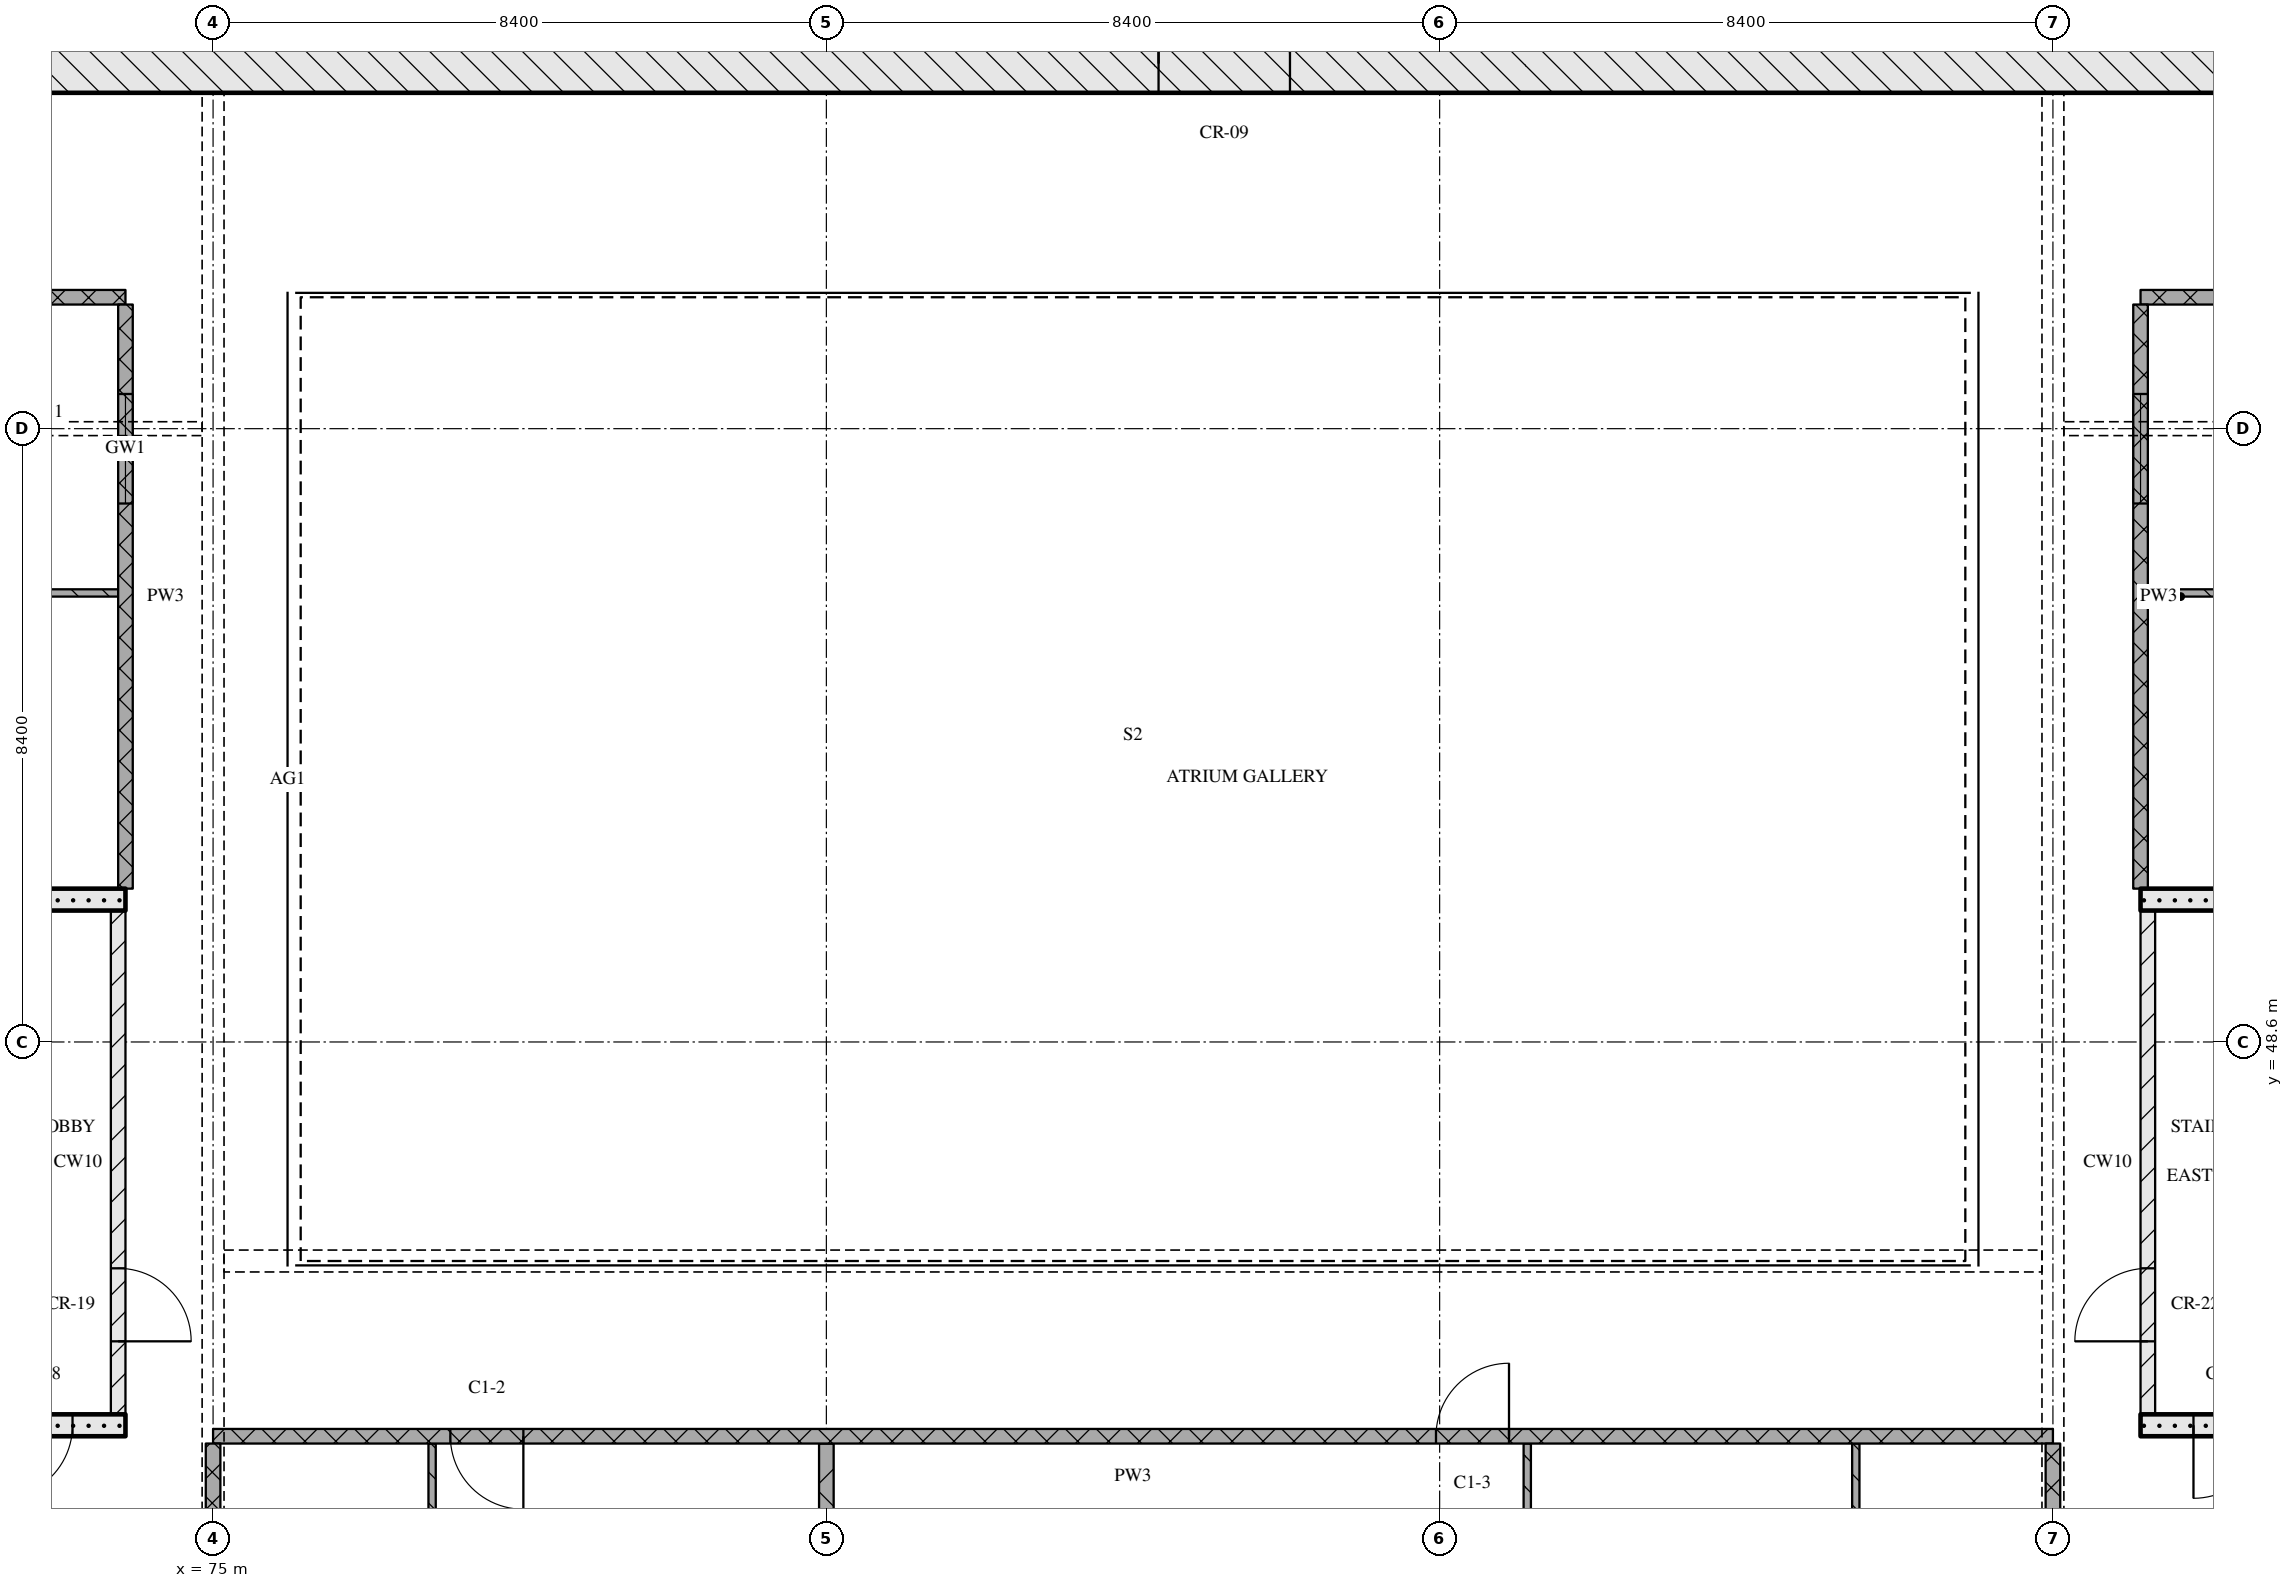
"""IFC4 building model, lengths in metres.
Left out: names, types, materials, properties, quantities, classifications, styles, units other than length and angle.
Written with IfcOpenShell. Run it as: python <this file> out.ifc"""

import sys

from ifc_helpers import new_model, si_unit, direction, frame, frame_2d, origin, place, context, subcontext, project, spatial, rectangle, extrude, element, fill, save


model = new_model("IFC4")
c1 = context("Model", 3, precision=1e-05, world=origin(), true_north=direction((0.0, 1.0)))
c2 = subcontext(c1, "Body", "Model", "MODEL_VIEW")
j1 = project(units=[si_unit("LENGTHUNIT", "METRE"), si_unit("PLANEANGLEUNIT", "RADIAN")], contexts=[c1])
p1 = place(None, origin())
s1 = spatial("IfcSite", under=j1, at=p1, CompositionType="ELEMENT")
p2 = place(p1, origin())
s2 = spatial("IfcBuilding", under=s1, at=p2, CompositionType="ELEMENT")
p3 = place(p2, frame((0.0, 0.0, 151.05)))
s3 = spatial("IfcBuildingStorey", under=s2, at=p3, CompositionType="ELEMENT", Elevation=151.05)
p4 = place(p3, frame((67.0, 62.0, 0.0), z_axis=(0.0, 0.0, 1.0), x_axis=(1.0, 0.0, 0.0)))
e1 = element("IfcWall", 1, at=p4, inside=s3, PredefinedType="SOLIDWALL", context=c2, shape_type="SweptSolid", body=[
    extrude(rectangle(XDim=41.2, YDim=0.8, at=frame_2d((20.6, 0.0))), origin(), (0.0, 0.0, 1.0), 3.32),
])
p5 = place(p4, frame((20.95, 0.0, 0.0)))
e2 = element("IfcOpeningElement", 2, at=p5, cuts=e1, PredefinedType="OPENING", context=c2, shape_type="SweptSolid", body=[
    extrude(rectangle(XDim=1.8, YDim=2.1, at=frame_2d((0.9, 1.05))), frame((0.0, 0.41, 0.0), z_axis=(0.0, -1.0, 0.0), x_axis=(1.0, 0.0, 0.0)), (0.0, 0.0, 1.0), 0.82),
])
p6 = place(p3, frame((68.2, 43.35, 0.0), z_axis=(0.0, 0.0, 1.0), x_axis=(1.0, 0.0, 0.0)))
e3 = element("IfcWall", 3, at=p6, inside=s3, PredefinedType="SOLIDWALL", context=c2, shape_type="SweptSolid", body=[
    extrude(rectangle(XDim=5.6, YDim=0.3, at=frame_2d((2.8, 0.0))), origin(), (0.0, 0.0, 1.0), 3.32),
])
p7 = place(p6, frame((3.875, 0.0, 0.0)))
e4 = element("IfcOpeningElement", 4, at=p7, cuts=e3, PredefinedType="OPENING", context=c2, shape_type="SweptSolid", body=[
    extrude(rectangle(XDim=1.0, YDim=2.1, at=frame_2d((0.5, 1.05))), frame((0.0, 0.16, 0.0), z_axis=(0.0, -1.0, 0.0), x_axis=(1.0, 0.0, 0.0)), (0.0, 0.0, 1.0), 0.32),
])
p8 = place(p3, frame((73.7, 43.5, 0.0), z_axis=(0.0, 0.0, 1.0), x_axis=(0.0, 1.0, 0.0)))
e5 = element("IfcWall", 5, at=p8, inside=s3, PredefinedType="PARTITIONING", context=c2, shape_type="SweptSolid", body=[
    extrude(rectangle(XDim=6.9, YDim=0.2, at=frame_2d((3.45, 0.0))), origin(), (0.0, 0.0, 1.0), 3.32),
])
p9 = place(p8, frame((1.0, 0.0, 0.0)))
e6 = element("IfcOpeningElement", 6, at=p9, cuts=e5, PredefinedType="OPENING", context=c2, shape_type="SweptSolid", body=[
    extrude(rectangle(XDim=1.0, YDim=2.1, at=frame_2d((0.5, 1.05))), frame((0.0, 0.11, 0.0), z_axis=(0.0, -1.0, 0.0), x_axis=(1.0, 0.0, 0.0)), (0.0, 0.0, 1.0), 0.22),
])
p10 = place(p3, frame((68.2, 50.55, 0.0), z_axis=(0.0, 0.0, 1.0), x_axis=(1.0, 0.0, 0.0)))
e7 = element("IfcWall", 7, at=p10, inside=s3, PredefinedType="SOLIDWALL", context=c2, shape_type="SweptSolid", body=[
    extrude(rectangle(XDim=5.6, YDim=0.3, at=frame_2d((2.8, 0.0))), origin(), (0.0, 0.0, 1.0), 3.32),
])
p11 = place(p3, frame((101.4, 43.35, 0.0), z_axis=(0.0, 0.0, 1.0), x_axis=(1.0, 0.0, 0.0)))
e8 = element("IfcWall", 8, at=p11, inside=s3, PredefinedType="SOLIDWALL", context=c2, shape_type="SweptSolid", body=[
    extrude(rectangle(XDim=5.6, YDim=0.3, at=frame_2d((2.8, 0.0))), origin(), (0.0, 0.0, 1.0), 3.32),
])
p12 = place(p11, frame((0.725, 0.0, 0.0)))
e9 = element("IfcOpeningElement", 9, at=p12, cuts=e8, PredefinedType="OPENING", context=c2, shape_type="SweptSolid", body=[
    extrude(rectangle(XDim=1.0, YDim=2.1, at=frame_2d((0.5, 1.05))), frame((0.0, 0.16, 0.0), z_axis=(0.0, -1.0, 0.0), x_axis=(1.0, 0.0, 0.0)), (0.0, 0.0, 1.0), 0.32),
])
p13 = place(p3, frame((101.5, 43.5, 0.0), z_axis=(0.0, 0.0, 1.0), x_axis=(0.0, 1.0, 0.0)))
e10 = element("IfcWall", 10, at=p13, inside=s3, PredefinedType="PARTITIONING", context=c2, shape_type="SweptSolid", body=[
    extrude(rectangle(XDim=6.9, YDim=0.2, at=frame_2d((3.45, 0.0))), origin(), (0.0, 0.0, 1.0), 3.32),
])
p14 = place(p13, frame((1.0, 0.0, 0.0)))
e11 = element("IfcOpeningElement", 11, at=p14, cuts=e10, PredefinedType="OPENING", context=c2, shape_type="SweptSolid", body=[
    extrude(rectangle(XDim=1.0, YDim=2.1, at=frame_2d((0.5, 1.05))), frame((0.0, 0.11, 0.0), z_axis=(0.0, -1.0, 0.0), x_axis=(1.0, 0.0, 0.0)), (0.0, 0.0, 1.0), 0.22),
])
p15 = place(p3, frame((101.4, 50.55, 0.0), z_axis=(0.0, 0.0, 1.0), x_axis=(1.0, 0.0, 0.0)))
e12 = element("IfcWall", 12, at=p15, inside=s3, PredefinedType="SOLIDWALL", context=c2, shape_type="SweptSolid", body=[
    extrude(rectangle(XDim=5.6, YDim=0.3, at=frame_2d((2.8, 0.0))), origin(), (0.0, 0.0, 1.0), 3.32),
])
p16 = place(p3, frame((100.2, 43.2, 0.0), z_axis=(0.0, 0.0, 1.0), x_axis=(-1.0, 0.0, 0.0)))
e13 = element("IfcWall", 13, at=p16, inside=s3, PredefinedType="PARTITIONING", context=c2, shape_type="SweptSolid", body=[
    extrude(rectangle(XDim=25.2, YDim=0.2, at=frame_2d((12.6, 0.0))), origin(), (0.0, 0.0, 1.0), 3.32),
])
p17 = place(p16, frame((7.45, 0.0, 0.0)))
e14 = element("IfcOpeningElement", 14, at=p17, cuts=e13, PredefinedType="OPENING", context=c2, shape_type="SweptSolid", body=[
    extrude(rectangle(XDim=1.0, YDim=2.1, at=frame_2d((0.5, 1.05))), frame((0.0, 0.11, 0.0), z_axis=(0.0, -1.0, 0.0), x_axis=(1.0, 0.0, 0.0)), (0.0, 0.0, 1.0), 0.22),
])
p18 = place(p16, frame((20.95, 0.0, 0.0)))
e15 = element("IfcOpeningElement", 15, at=p18, cuts=e13, PredefinedType="OPENING", context=c2, shape_type="SweptSolid", body=[
    extrude(rectangle(XDim=1.0, YDim=2.1, at=frame_2d((0.5, 1.05))), frame((0.0, 0.11, 0.0), z_axis=(0.0, -1.0, 0.0), x_axis=(1.0, 0.0, 0.0)), (0.0, 0.0, 1.0), 0.22),
])
p19 = place(p3, frame((69.3, 54.75, 0.0), z_axis=(0.0, 0.0, 1.0), x_axis=(1.0, 0.0, 0.0)))
e16 = element("IfcWall", 16, at=p19, inside=s3, PredefinedType="PARTITIONING", context=c2, shape_type="SweptSolid", body=[
    extrude(rectangle(XDim=4.4, YDim=0.1, at=frame_2d((2.2, 0.0))), origin(), (0.0, 0.0, 1.0), 3.32),
])
p20 = place(p3, frame((101.5, 54.75, 0.0), z_axis=(0.0, 0.0, 1.0), x_axis=(1.0, 0.0, 0.0)))
e17 = element("IfcWall", 17, at=p20, inside=s3, PredefinedType="PARTITIONING", context=c2, shape_type="SweptSolid", body=[
    extrude(rectangle(XDim=4.4, YDim=0.1, at=frame_2d((2.2, 0.0))), origin(), (0.0, 0.0, 1.0), 3.32),
])
p21 = place(p20, frame((1.7, 0.0, 0.0)))
e18 = element("IfcOpeningElement", 18, at=p21, cuts=e17, PredefinedType="OPENING", context=c2, shape_type="SweptSolid", body=[
    extrude(rectangle(XDim=0.9, YDim=2.1, at=frame_2d((0.45, 1.05))), frame((0.0, 0.06, 0.0), z_axis=(0.0, -1.0, 0.0), x_axis=(1.0, 0.0, 0.0)), (0.0, 0.0, 1.0), 0.12),
])
for number, where, z_axis, x_axis in (
    (19, (63.0, 58.8, 0.0), (0.0, 0.0, 1.0), (1.0, 0.0, 0.0)),
    (20, (101.4, 58.8, 0.0), (0.0, 0.0, 1.0), (1.0, 0.0, 0.0)),
):
    element("IfcWall", number, at=place(p3, frame(where, z_axis=z_axis, x_axis=x_axis)), inside=s3, PredefinedType="PARTITIONING", context=c2, shape_type="SweptSolid", body=[
        extrude(rectangle(XDim=10.8, YDim=0.2, at=frame_2d((5.4, 0.0))), origin(), (0.0, 0.0, 1.0), 3.32),
    ])
p22 = place(p3, frame((73.8, 58.7, 0.0), z_axis=(0.0, 0.0, 1.0), x_axis=(0.0, -1.0, 0.0)))
e21 = element("IfcWall", 21, at=p22, inside=s3, PredefinedType="PARTITIONING", context=c2, shape_type="SweptSolid", body=[
    extrude(rectangle(XDim=8.0, YDim=0.2, at=frame_2d((4.0, 0.0))), origin(), (0.0, 0.0, 1.0), 3.32),
])
p23 = place(p22, frame((1.225, 0.0, 0.9)))
e22 = element("IfcOpeningElement", 22, at=p23, cuts=e21, PredefinedType="OPENING", context=c2, shape_type="SweptSolid", body=[
    extrude(rectangle(XDim=1.5, YDim=1.5, at=frame_2d((0.75, 0.75))), frame((0.0, 0.11, 0.0), z_axis=(0.0, -1.0, 0.0), x_axis=(1.0, 0.0, 0.0)), (0.0, 0.0, 1.0), 0.22),
])
p24 = place(p3, frame((75.0, 43.1, 0.0), z_axis=(0.0, 0.0, 1.0), x_axis=(0.0, -1.0, 0.0)))
e23 = element("IfcWall", 23, at=p24, inside=s3, PredefinedType="PARTITIONING", context=c2, shape_type="SweptSolid", body=[
    extrude(rectangle(XDim=2.2, YDim=0.2, at=frame_2d((1.1, 0.0))), origin(), (0.0, 0.0, 1.0), 2.43),
])
p25 = place(p3, frame((78.0, 43.1, 0.0), z_axis=(0.0, 0.0, 1.0), x_axis=(0.0, -1.0, 0.0)))
e24 = element("IfcWall", 24, at=p25, inside=s3, PredefinedType="PARTITIONING", context=c2, shape_type="SweptSolid", body=[
    extrude(rectangle(XDim=4.65, YDim=0.1, at=frame_2d((2.325, 0.0))), origin(), (0.0, 0.0, 1.0), 3.32),
])
p26 = place(p3, frame((83.4, 43.1, 0.0), z_axis=(0.0, 0.0, 1.0), x_axis=(0.0, -1.0, 0.0)))
e25 = element("IfcWall", 25, at=p26, inside=s3, PredefinedType="PARTITIONING", context=c2, shape_type="SweptSolid", body=[
    extrude(rectangle(XDim=2.53, YDim=0.2, at=frame_2d((1.265, 0.0))), origin(), (0.0, 0.0, 1.0), 3.32),
])
p27 = place(p3, frame((93.0, 43.1, 0.0), z_axis=(0.0, 0.0, 1.0), x_axis=(0.0, -1.0, 0.0)))
e26 = element("IfcWall", 26, at=p27, inside=s3, PredefinedType="PARTITIONING", context=c2, shape_type="SweptSolid", body=[
    extrude(rectangle(XDim=4.35, YDim=0.1, at=frame_2d((2.175, 0.0))), origin(), (0.0, 0.0, 1.0), 3.32),
])
p28 = place(p27, frame((1.6, 0.0, 0.0)))
e27 = element("IfcOpeningElement", 27, at=p28, cuts=e26, PredefinedType="OPENING", context=c2, shape_type="SweptSolid", body=[
    extrude(rectangle(XDim=0.8, YDim=2.1, at=frame_2d((0.4, 1.05))), frame((0.0, 0.06, 0.0), z_axis=(0.0, -1.0, 0.0), x_axis=(1.0, 0.0, 0.0)), (0.0, 0.0, 1.0), 0.12),
])
p29 = place(p3, frame((97.5, 43.1, 0.0), z_axis=(0.0, 0.0, 1.0), x_axis=(0.0, -1.0, 0.0)))
e28 = element("IfcWall", 28, at=p29, inside=s3, PredefinedType="PARTITIONING", context=c2, shape_type="SweptSolid", body=[
    extrude(rectangle(XDim=4.35, YDim=0.1, at=frame_2d((2.175, 0.0))), origin(), (0.0, 0.0, 1.0), 3.32),
])
p30 = place(p3, frame((100.2, 43.1, 0.0), z_axis=(0.0, 0.0, 1.0), x_axis=(0.0, -1.0, 0.0)))
e29 = element("IfcWall", 29, at=p30, inside=s3, PredefinedType="PARTITIONING", context=c2, shape_type="SweptSolid", body=[
    extrude(rectangle(XDim=2.2, YDim=0.2, at=frame_2d((1.1, 0.0))), origin(), (0.0, 0.0, 1.0), 2.43),
])
p31 = place(p3, frame((101.4, 58.7, 0.0), z_axis=(0.0, 0.0, 1.0), x_axis=(0.0, -1.0, 0.0)))
e30 = element("IfcWall", 30, at=p31, inside=s3, PredefinedType="PARTITIONING", context=c2, shape_type="SweptSolid", body=[
    extrude(rectangle(XDim=8.0, YDim=0.2, at=frame_2d((4.0, 0.0))), origin(), (0.0, 0.0, 1.0), 3.32),
])
p32 = place(p31, frame((1.225, 0.0, 0.9)))
e31 = element("IfcOpeningElement", 31, at=p32, cuts=e30, PredefinedType="OPENING", context=c2, shape_type="SweptSolid", body=[
    extrude(rectangle(XDim=1.5, YDim=1.5, at=frame_2d((0.75, 0.75))), frame((0.0, 0.11, 0.0), z_axis=(0.0, -1.0, 0.0), x_axis=(1.0, 0.0, 0.0)), (0.0, 0.0, 1.0), 0.22),
])
p33 = place(p5, origin())
e32 = element("IfcDoor", 32, at=p33, inside=s3, OperationType="DOUBLE_DOOR_SINGLE_SWING", PredefinedType="DOOR", context=c2, shape_type="SweptSolid", body=[
    extrude(rectangle(XDim=1.8, YDim=2.1, at=frame_2d((0.9, 1.05))), frame((0.0, 0.025, 0.0), z_axis=(0.0, -1.0, 0.0), x_axis=(1.0, 0.0, 0.0)), (0.0, 0.0, 1.0), 0.05),
])
fill(e2, e32)
p34 = place(p7, origin())
e33 = element("IfcDoor", 33, at=p34, inside=s3, OperationType="SINGLE_SWING_RIGHT", PredefinedType="DOOR", context=c2, shape_type="SweptSolid", body=[
    extrude(rectangle(XDim=1.0, YDim=2.1, at=frame_2d((0.5, 1.05))), frame((0.0, 0.025, 0.0), z_axis=(0.0, -1.0, 0.0), x_axis=(1.0, 0.0, 0.0)), (0.0, 0.0, 1.0), 0.05),
])
fill(e4, e33)
p35 = place(p9, origin())
e34 = element("IfcDoor", 34, at=p35, inside=s3, OperationType="SINGLE_SWING_RIGHT", PredefinedType="DOOR", context=c2, shape_type="SweptSolid", body=[
    extrude(rectangle(XDim=1.0, YDim=2.1, at=frame_2d((0.5, 1.05))), frame((0.0, 0.025, 0.0), z_axis=(0.0, -1.0, 0.0), x_axis=(1.0, 0.0, 0.0)), (0.0, 0.0, 1.0), 0.05),
])
fill(e6, e34)
p36 = place(p12, origin())
e35 = element("IfcDoor", 35, at=p36, inside=s3, OperationType="SINGLE_SWING_RIGHT", PredefinedType="DOOR", context=c2, shape_type="SweptSolid", body=[
    extrude(rectangle(XDim=1.0, YDim=2.1, at=frame_2d((0.5, 1.05))), frame((0.0, 0.025, 0.0), z_axis=(0.0, -1.0, 0.0), x_axis=(1.0, 0.0, 0.0)), (0.0, 0.0, 1.0), 0.05),
])
fill(e9, e35)
p37 = place(p14, origin())
e36 = element("IfcDoor", 36, at=p37, inside=s3, OperationType="SINGLE_SWING_LEFT", PredefinedType="DOOR", context=c2, shape_type="SweptSolid", body=[
    extrude(rectangle(XDim=1.0, YDim=2.1, at=frame_2d((0.5, 1.05))), frame((0.0, 0.025, 0.0), z_axis=(0.0, -1.0, 0.0), x_axis=(1.0, 0.0, 0.0)), (0.0, 0.0, 1.0), 0.05),
])
fill(e11, e36)
p38 = place(p17, origin())
e37 = element("IfcDoor", 37, at=p38, inside=s3, OperationType="SINGLE_SWING_RIGHT", PredefinedType="DOOR", context=c2, shape_type="SweptSolid", body=[
    extrude(rectangle(XDim=1.0, YDim=2.1, at=frame_2d((0.5, 1.05))), frame((0.0, 0.025, 0.0), z_axis=(0.0, -1.0, 0.0), x_axis=(1.0, 0.0, 0.0)), (0.0, 0.0, 1.0), 0.05),
])
fill(e14, e37)
p39 = place(p18, origin())
e38 = element("IfcDoor", 38, at=p39, inside=s3, OperationType="SINGLE_SWING_LEFT", PredefinedType="DOOR", context=c2, shape_type="SweptSolid", body=[
    extrude(rectangle(XDim=1.0, YDim=2.1, at=frame_2d((0.5, 1.05))), frame((0.0, 0.025, 0.0), z_axis=(0.0, -1.0, 0.0), x_axis=(1.0, 0.0, 0.0)), (0.0, 0.0, 1.0), 0.05),
])
fill(e15, e38)
p40 = place(p23, origin())
e39 = element("IfcWindow", 39, at=p40, inside=s3, PartitioningType="SINGLE_PANEL", PredefinedType="WINDOW", context=c2, shape_type="SweptSolid", body=[
    extrude(rectangle(XDim=1.5, YDim=1.5, at=frame_2d((0.75, 0.75))), frame((0.0, 0.03, 0.0), z_axis=(0.0, -1.0, 0.0), x_axis=(1.0, 0.0, 0.0)), (0.0, 0.0, 1.0), 0.06),
])
fill(e22, e39)
p41 = place(p32, origin())
e40 = element("IfcWindow", 40, at=p41, inside=s3, PartitioningType="SINGLE_PANEL", PredefinedType="WINDOW", context=c2, shape_type="SweptSolid", body=[
    extrude(rectangle(XDim=1.5, YDim=1.5, at=frame_2d((0.75, 0.75))), frame((0.0, 0.03, 0.0), z_axis=(0.0, -1.0, 0.0), x_axis=(1.0, 0.0, 0.0)), (0.0, 0.0, 1.0), 0.06),
])
fill(e31, e40)
save(model, sys.argv[1])
